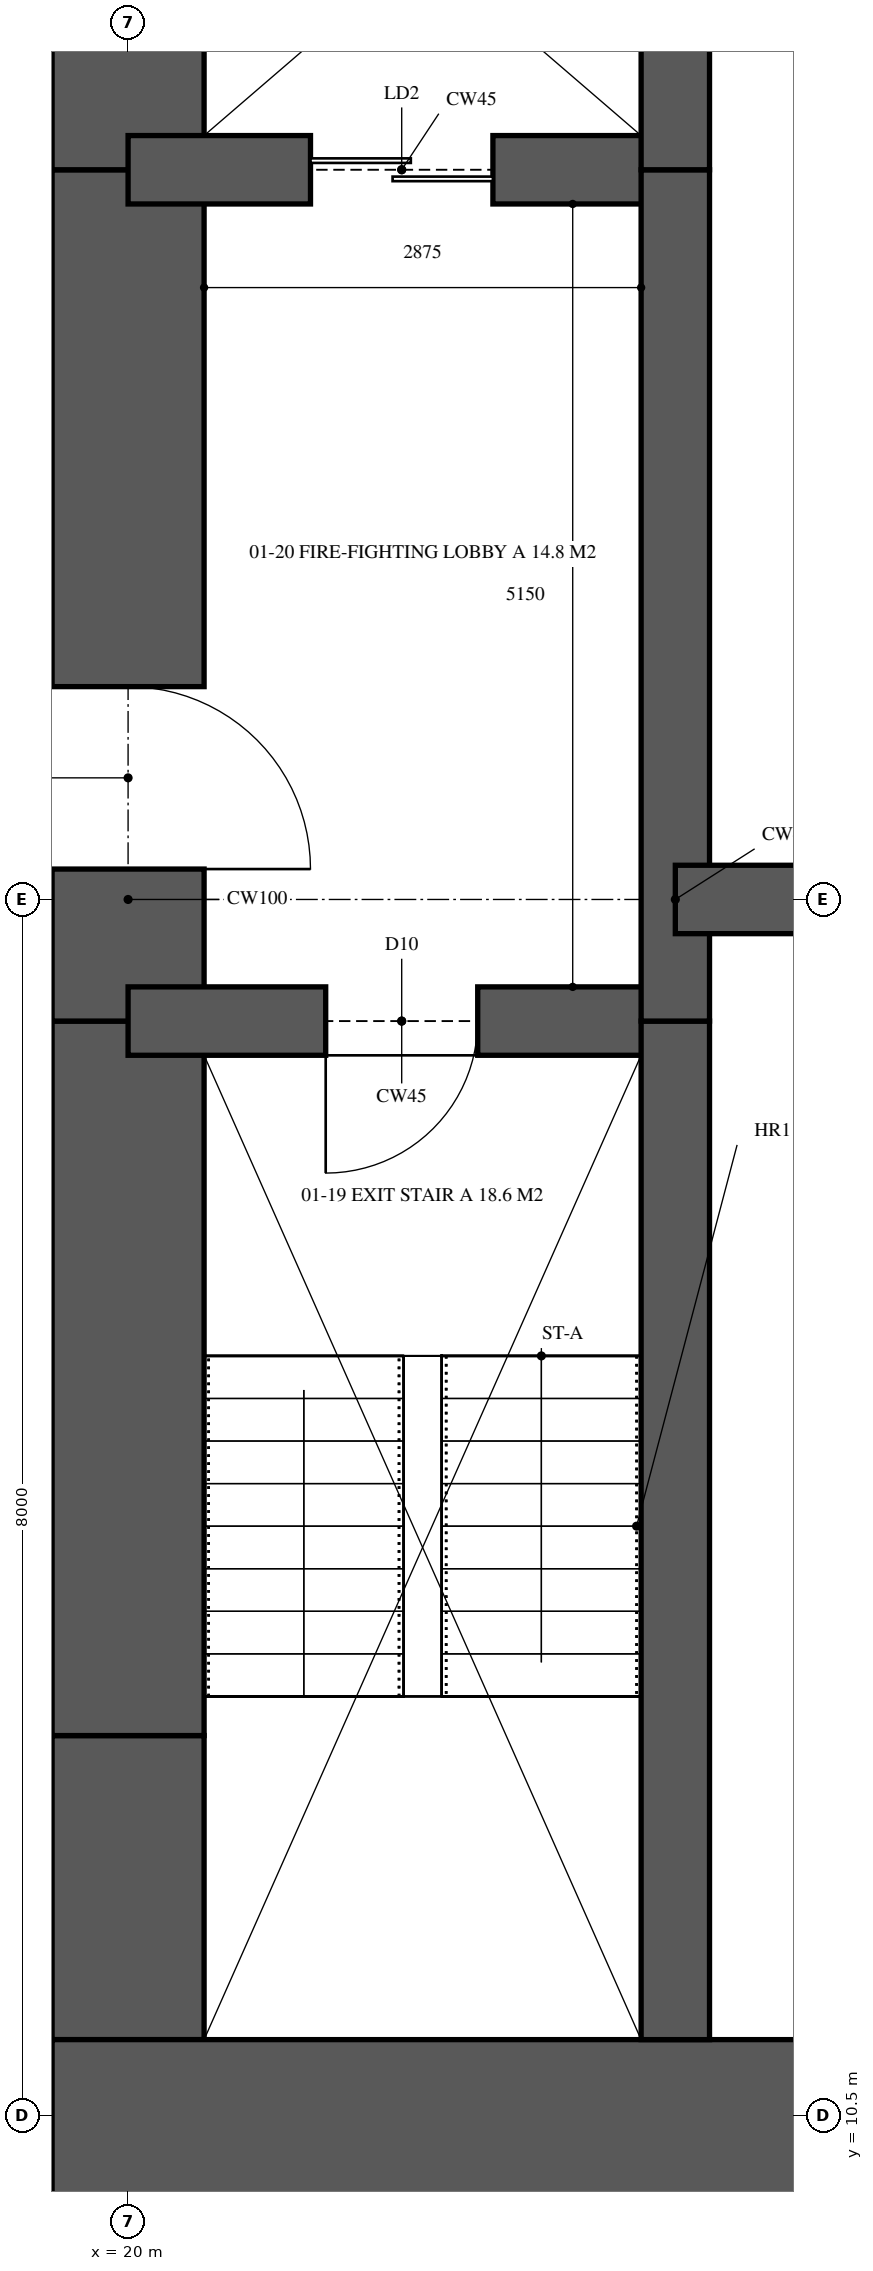
"""IFC4 building model, lengths in metres.
Left out: names, types, materials, properties, quantities, classifications, styles, units other than length and angle.
Written with IfcOpenShell. Run it as: python <this file> out.ifc"""

import sys

from ifc_helpers import new_model, si_unit, direction, frame, frame_2d, origin, place, context, subcontext, project, spatial, rectangle, extrude, element, fill, save


model = new_model("IFC4")
c1 = context("Model", 3, precision=1e-05, world=origin(), true_north=direction((0.0, 1.0)))
c2 = subcontext(c1, "Body", "Model", "MODEL_VIEW")
j1 = project(units=[si_unit("LENGTHUNIT", "METRE"), si_unit("PLANEANGLEUNIT", "RADIAN")], contexts=[c1])
p1 = place(None, origin())
s1 = spatial("IfcSite", under=j1, at=p1, CompositionType="ELEMENT")
p2 = place(p1, origin())
s2 = spatial("IfcBuilding", under=s1, at=p2, CompositionType="ELEMENT")
p3 = place(p2, frame((0.0, 0.0, 6.0)))
s3 = spatial("IfcBuildingStorey", under=s2, at=p3, CompositionType="ELEMENT", Elevation=6.0)
p4 = place(p3, frame((19.5, 10.125, 0.0), z_axis=(0.0, 0.0, 1.0), x_axis=(1.0, 0.0, 0.0)))
e1 = element("IfcWall", 1, at=p4, inside=s3, PredefinedType="SHEAR", context=c2, shape_type="SweptSolid", body=[
    extrude(rectangle(XDim=6.5, YDim=1.75, at=frame_2d((3.25, 0.0))), origin(), (0.0, 0.0, 1.0), 5.0),
])
p5 = place(p4, frame((4.925, 0.0, 0.0)))
e2 = element("IfcOpeningElement", 2, at=p5, cuts=e1, PredefinedType="OPENING", context=c2, shape_type="SweptSolid", body=[
    extrude(rectangle(XDim=0.75, YDim=2.1, at=frame_2d((0.375, 1.05))), frame((0.0, 0.885, 0.0), z_axis=(0.0, -1.0, 0.0), x_axis=(1.0, 0.0, 0.0)), (0.0, 0.0, 1.0), 1.77),
])
p6 = place(p3, frame((20.0, 26.0, 0.0), z_axis=(0.0, 0.0, 1.0), x_axis=(0.0, -1.0, 0.0)))
e3 = element("IfcWall", 3, at=p6, inside=s3, PredefinedType="SHEAR", context=c2, shape_type="SweptSolid", body=[
    extrude(rectangle(XDim=2.7, YDim=1.0, at=frame_2d((1.35, 0.0))), origin(), (0.0, 0.0, 1.0), 5.0),
])
p7 = place(p3, frame((20.0, 23.3, 0.0), z_axis=(0.0, 0.0, 1.0), x_axis=(0.0, -1.0, 0.0)))
e4 = element("IfcWall", 4, at=p7, inside=s3, PredefinedType="SHEAR", context=c2, shape_type="SweptSolid", body=[
    extrude(rectangle(XDim=5.6, YDim=1.0, at=frame_2d((2.8, 0.0))), origin(), (0.0, 0.0, 1.0), 5.0),
])
p8 = place(p7, frame((3.4, 0.0, 0.0)))
e5 = element("IfcOpeningElement", 5, at=p8, cuts=e4, PredefinedType="OPENING", context=c2, shape_type="SweptSolid", body=[
    extrude(rectangle(XDim=1.2, YDim=2.2, at=frame_2d((0.6, 1.1))), frame((0.0, 0.51, 0.0), z_axis=(0.0, -1.0, 0.0), x_axis=(1.0, 0.0, 0.0)), (0.0, 0.0, 1.0), 1.02),
])
p9 = place(p3, frame((20.0, 17.7, 0.0), z_axis=(0.0, 0.0, 1.0), x_axis=(0.0, -1.0, 0.0)))
e6 = element("IfcWall", 6, at=p9, inside=s3, PredefinedType="SHEAR", context=c2, shape_type="SweptSolid", body=[
    extrude(rectangle(XDim=4.7, YDim=1.0, at=frame_2d((2.35, 0.0))), origin(), (0.0, 0.0, 1.0), 5.0),
])
p10 = place(p3, frame((20.0, 13.0, 0.0), z_axis=(0.0, 0.0, 1.0), x_axis=(0.0, -1.0, 0.0)))
e7 = element("IfcWall", 7, at=p10, inside=s3, PredefinedType="SHEAR", context=c2, shape_type="SweptSolid", body=[
    extrude(rectangle(XDim=2.0, YDim=1.0, at=frame_2d((1.0, 0.0))), origin(), (0.0, 0.0, 1.0), 5.0),
])
p11 = place(p3, frame((23.6, 11.0, 0.0), z_axis=(0.0, 0.0, 1.0), x_axis=(0.0, 1.0, 0.0)))
e8 = element("IfcWall", 8, at=p11, inside=s3, PredefinedType="SHEAR", context=c2, shape_type="SweptSolid", body=[
    extrude(rectangle(XDim=6.7, YDim=0.45, at=frame_2d((3.35, 0.0))), origin(), (0.0, 0.0, 1.0), 5.0),
])
p12 = place(p3, frame((23.6, 17.7, 0.0), z_axis=(0.0, 0.0, 1.0), x_axis=(0.0, 1.0, 0.0)))
e9 = element("IfcWall", 9, at=p12, inside=s3, PredefinedType="SHEAR", context=c2, shape_type="SweptSolid", body=[
    extrude(rectangle(XDim=5.6, YDim=0.45, at=frame_2d((2.8, 0.0))), origin(), (0.0, 0.0, 1.0), 5.0),
])
p13 = place(p3, frame((23.6, 23.3, 0.0), z_axis=(0.0, 0.0, 1.0), x_axis=(0.0, 1.0, 0.0)))
e10 = element("IfcWall", 10, at=p13, inside=s3, PredefinedType="SHEAR", context=c2, shape_type="SweptSolid", body=[
    extrude(rectangle(XDim=2.7, YDim=0.45, at=frame_2d((1.35, 0.0))), origin(), (0.0, 0.0, 1.0), 5.0),
])
p14 = place(p3, frame((20.0, 17.7, 0.0), z_axis=(0.0, 0.0, 1.0), x_axis=(1.0, 0.0, 0.0)))
e11 = element("IfcWall", 11, at=p14, inside=s3, PredefinedType="SHEAR", context=c2, shape_type="SweptSolid", body=[
    extrude(rectangle(XDim=3.6, YDim=0.45, at=frame_2d((1.8, 0.0))), origin(), (0.0, 0.0, 1.0), 5.0),
])
p15 = place(p14, frame((1.3, 0.0, 0.0)))
e12 = element("IfcOpeningElement", 12, at=p15, cuts=e11, PredefinedType="OPENING", context=c2, shape_type="SweptSolid", body=[
    extrude(rectangle(XDim=1.0, YDim=2.1, at=frame_2d((0.5, 1.05))), frame((0.0, 0.235, 0.0), z_axis=(0.0, -1.0, 0.0), x_axis=(1.0, 0.0, 0.0)), (0.0, 0.0, 1.0), 0.47),
])
p16 = place(p3, frame((20.0, 23.3, 0.0), z_axis=(0.0, 0.0, 1.0), x_axis=(1.0, 0.0, 0.0)))
e13 = element("IfcWall", 13, at=p16, inside=s3, PredefinedType="SHEAR", context=c2, shape_type="SweptSolid", body=[
    extrude(rectangle(XDim=3.6, YDim=0.45, at=frame_2d((1.8, 0.0))), origin(), (0.0, 0.0, 1.0), 5.0),
])
p17 = place(p16, frame((1.2, 0.0, 0.0)))
e14 = element("IfcOpeningElement", 14, at=p17, cuts=e13, PredefinedType="OPENING", context=c2, shape_type="SweptSolid", body=[
    extrude(rectangle(XDim=1.2, YDim=2.1, at=frame_2d((0.6, 1.05))), frame((0.0, 0.235, 0.0), z_axis=(0.0, -1.0, 0.0), x_axis=(1.0, 0.0, 0.0)), (0.0, 0.0, 1.0), 0.47),
])
p18 = place(p3, frame((23.6, 18.5, 0.0), z_axis=(0.0, 0.0, 1.0), x_axis=(1.0, 0.0, 0.0)))
e15 = element("IfcWall", 15, at=p18, inside=s3, PredefinedType="SHEAR", context=c2, shape_type="SweptSolid", body=[
    extrude(rectangle(XDim=2.4, YDim=0.45, at=frame_2d((1.2, 0.0))), origin(), (0.0, 0.0, 1.0), 5.0),
])
p19 = place(p15, frame((1.0, 0.0, 0.0), z_axis=(0.0, 0.0, 1.0), x_axis=(-1.0, 0.0, 0.0)))
e16 = element("IfcDoor", 16, at=p19, inside=s3, OperationType="SINGLE_SWING_RIGHT", PredefinedType="DOOR", context=c2, shape_type="SweptSolid", body=[
    extrude(rectangle(XDim=1.0, YDim=2.1, at=frame_2d((0.5, 1.05))), frame((0.0, 0.025, 0.0), z_axis=(0.0, -1.0, 0.0), x_axis=(1.0, 0.0, 0.0)), (0.0, 0.0, 1.0), 0.05),
])
fill(e12, e16)
p20 = place(p8, origin())
e17 = element("IfcDoor", 17, at=p20, inside=s3, OperationType="SINGLE_SWING_RIGHT", PredefinedType="DOOR", context=c2, shape_type="SweptSolid", body=[
    extrude(rectangle(XDim=1.2, YDim=2.2, at=frame_2d((0.6, 1.1))), frame((0.0, 0.025, 0.0), z_axis=(0.0, -1.0, 0.0), x_axis=(1.0, 0.0, 0.0)), (0.0, 0.0, 1.0), 0.05),
])
fill(e5, e17)
p21 = place(p17, origin())
e18 = element("IfcDoor", 18, at=p21, inside=s3, OperationType="SLIDING_TO_LEFT", PredefinedType="DOOR", context=c2, shape_type="SweptSolid", body=[
    extrude(rectangle(XDim=1.2, YDim=2.1, at=frame_2d((0.6, 1.05))), frame((0.0, 0.025, 0.0), z_axis=(0.0, -1.0, 0.0), x_axis=(1.0, 0.0, 0.0)), (0.0, 0.0, 1.0), 0.05),
])
fill(e14, e18)
save(model, sys.argv[1])
